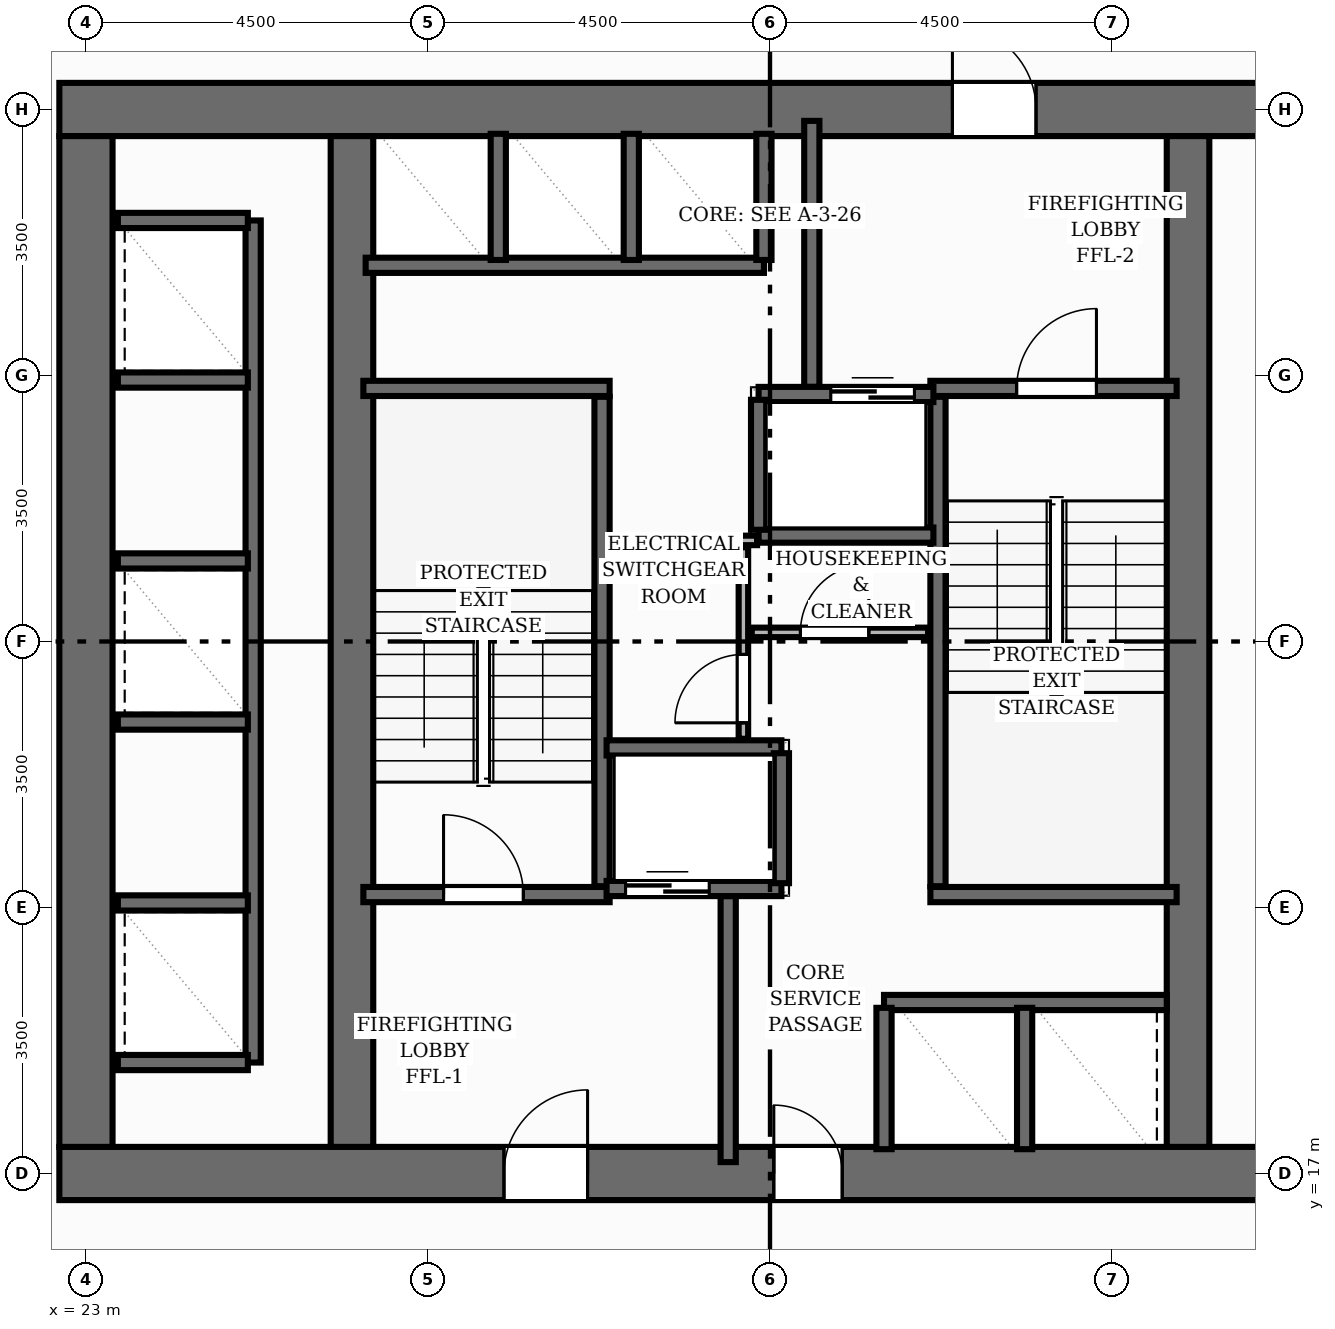
"""IFC4 building model, lengths in metres.
Left out: names, types, materials, properties, quantities, classifications, styles, units other than length and angle.
Written with IfcOpenShell. Run it as: python <this file> out.ifc"""

import sys

from ifc_helpers import new_model, si_unit, direction, frame, frame_2d, origin, place, context, subcontext, project, spatial, rectangle, extrude, element, fill, save


model = new_model("IFC4")
c1 = context("Model", 3, precision=1e-05, world=origin(), true_north=direction((0.0, 1.0)))
c2 = subcontext(c1, "Body", "Model", "MODEL_VIEW")
j1 = project(units=[si_unit("LENGTHUNIT", "METRE"), si_unit("PLANEANGLEUNIT", "RADIAN")], contexts=[c1])
p1 = place(None, origin())
s1 = spatial("IfcSite", under=j1, at=p1, CompositionType="ELEMENT")
p2 = place(p1, origin())
s2 = spatial("IfcBuilding", under=s1, at=p2, CompositionType="ELEMENT")
p3 = place(p2, frame((0.0, 0.0, 102.88)))
s3 = spatial("IfcBuildingStorey", under=s2, at=p3, CompositionType="ELEMENT", Elevation=102.88)
p4 = place(p3, frame((22.65, 17.0, 0.0), z_axis=(0.0, 0.0, 1.0), x_axis=(1.0, 0.0, 0.0)))
e1 = element("IfcWall", 1, at=p4, inside=s3, PredefinedType="SHEAR", context=c2, shape_type="SweptSolid", body=[
    extrude(rectangle(XDim=18.7, YDim=0.7, at=frame_2d((9.35, 0.0))), origin(), (0.0, 0.0, 1.0), 3.2),
])
p5 = place(p4, frame((5.85, 0.0, 0.0)))
e2 = element("IfcOpeningElement", 2, at=p5, cuts=e1, PredefinedType="OPENING", context=c2, shape_type="SweptSolid", body=[
    extrude(rectangle(XDim=1.1, YDim=2.15, at=frame_2d((0.55, 1.075))), frame((0.0, 0.36, 0.0), z_axis=(0.0, -1.0, 0.0), x_axis=(1.0, 0.0, 0.0)), (0.0, 0.0, 1.0), 0.72),
])
p6 = place(p4, frame((9.4, 0.0, 0.0)))
e3 = element("IfcOpeningElement", 3, at=p6, cuts=e1, PredefinedType="OPENING", context=c2, shape_type="SweptSolid", body=[
    extrude(rectangle(XDim=0.9, YDim=2.1, at=frame_2d((0.45, 1.05))), frame((0.0, 0.36, 0.0), z_axis=(0.0, -1.0, 0.0), x_axis=(1.0, 0.0, 0.0)), (0.0, 0.0, 1.0), 0.72),
])
p7 = place(p3, frame((22.65, 31.0, 0.0), z_axis=(0.0, 0.0, 1.0), x_axis=(1.0, 0.0, 0.0)))
e4 = element("IfcWall", 4, at=p7, inside=s3, PredefinedType="SHEAR", context=c2, shape_type="SweptSolid", body=[
    extrude(rectangle(XDim=18.7, YDim=0.7, at=frame_2d((9.35, 0.0))), origin(), (0.0, 0.0, 1.0), 3.2),
])
p8 = place(p7, frame((11.75, 0.0, 0.0)))
e5 = element("IfcOpeningElement", 5, at=p8, cuts=e4, PredefinedType="OPENING", context=c2, shape_type="SweptSolid", body=[
    extrude(rectangle(XDim=1.1, YDim=2.15, at=frame_2d((0.55, 1.075))), frame((0.0, 0.36, 0.0), z_axis=(0.0, -1.0, 0.0), x_axis=(1.0, 0.0, 0.0)), (0.0, 0.0, 1.0), 0.72),
])
p9 = place(p3, frame((23.0, 17.35, 0.0), z_axis=(0.0, 0.0, 1.0), x_axis=(0.0, 1.0, 0.0)))
e6 = element("IfcWall", 6, at=p9, inside=s3, PredefinedType="SHEAR", context=c2, shape_type="SweptSolid", body=[
    extrude(rectangle(XDim=13.3, YDim=0.7, at=frame_2d((6.65, 0.0))), origin(), (0.0, 0.0, 1.0), 3.2),
])
for number, where, z_axis, x_axis in (
    (7, (26.5, 17.35, 0.0), (0.0, 0.0, 1.0), (0.0, 1.0, 0.0)),
    (8, (37.5, 17.35, 0.0), (0.0, 0.0, 1.0), (0.0, 1.0, 0.0)),
):
    element("IfcWall", number, at=place(p3, frame(where, z_axis=z_axis, x_axis=x_axis)), inside=s3, PredefinedType="SHEAR", context=c2, shape_type="SweptSolid", body=[
        extrude(rectangle(XDim=13.3, YDim=0.56, at=frame_2d((6.65, 0.0))), origin(), (0.0, 0.0, 1.0), 3.2),
    ])
p10 = place(p3, frame((29.79, 20.78, 0.0), z_axis=(0.0, 0.0, 1.0), x_axis=(0.0, 1.0, 0.0)))
e9 = element("IfcWall", 9, at=p10, inside=s3, PredefinedType="SHEAR", context=c2, shape_type="SweptSolid", body=[
    extrude(rectangle(XDim=6.44, YDim=0.2, at=frame_2d((3.22, 0.0))), origin(), (0.0, 0.0, 1.0), 3.2),
])
p11 = place(p3, frame((26.65, 27.33, 0.0), z_axis=(0.0, 0.0, 1.0), x_axis=(1.0, 0.0, 0.0)))
e10 = element("IfcWall", 10, at=p11, inside=s3, PredefinedType="SHEAR", context=c2, shape_type="SweptSolid", body=[
    extrude(rectangle(XDim=3.24, YDim=0.2, at=frame_2d((1.62, 0.0))), origin(), (0.0, 0.0, 1.0), 3.2),
])
p12 = place(p3, frame((26.65, 20.67, 0.0), z_axis=(0.0, 0.0, 1.0), x_axis=(1.0, 0.0, 0.0)))
e11 = element("IfcWall", 11, at=p12, inside=s3, PredefinedType="SHEAR", context=c2, shape_type="SweptSolid", body=[
    extrude(rectangle(XDim=3.24, YDim=0.2, at=frame_2d((1.62, 0.0))), origin(), (0.0, 0.0, 1.0), 3.2),
])
p13 = place(p12, frame((1.055, 0.0, 0.0)))
e12 = element("IfcOpeningElement", 12, at=p13, cuts=e11, PredefinedType="OPENING", context=c2, shape_type="SweptSolid", body=[
    extrude(rectangle(XDim=1.05, YDim=2.15, at=frame_2d((0.525, 1.075))), frame((0.0, 0.11, 0.0), z_axis=(0.0, -1.0, 0.0), x_axis=(1.0, 0.0, 0.0)), (0.0, 0.0, 1.0), 0.22),
])
p14 = place(p3, frame((34.21, 20.78, 0.0), z_axis=(0.0, 0.0, 1.0), x_axis=(0.0, 1.0, 0.0)))
e13 = element("IfcWall", 13, at=p14, inside=s3, PredefinedType="SHEAR", context=c2, shape_type="SweptSolid", body=[
    extrude(rectangle(XDim=6.44, YDim=0.2, at=frame_2d((3.22, 0.0))), origin(), (0.0, 0.0, 1.0), 3.2),
])
p15 = place(p3, frame((34.11, 20.67, 0.0), z_axis=(0.0, 0.0, 1.0), x_axis=(1.0, 0.0, 0.0)))
e14 = element("IfcWall", 14, at=p15, inside=s3, PredefinedType="SHEAR", context=c2, shape_type="SweptSolid", body=[
    extrude(rectangle(XDim=3.24, YDim=0.2, at=frame_2d((1.62, 0.0))), origin(), (0.0, 0.0, 1.0), 3.2),
])
p16 = place(p3, frame((34.11, 27.33, 0.0), z_axis=(0.0, 0.0, 1.0), x_axis=(1.0, 0.0, 0.0)))
e15 = element("IfcWall", 15, at=p16, inside=s3, PredefinedType="SHEAR", context=c2, shape_type="SweptSolid", body=[
    extrude(rectangle(XDim=3.24, YDim=0.2, at=frame_2d((1.62, 0.0))), origin(), (0.0, 0.0, 1.0), 3.2),
])
p17 = place(p16, frame((1.135, 0.0, 0.0)))
e16 = element("IfcOpeningElement", 16, at=p17, cuts=e15, PredefinedType="OPENING", context=c2, shape_type="SweptSolid", body=[
    extrude(rectangle(XDim=1.05, YDim=2.15, at=frame_2d((0.525, 1.075))), frame((0.0, 0.11, 0.0), z_axis=(0.0, -1.0, 0.0), x_axis=(1.0, 0.0, 0.0)), (0.0, 0.0, 1.0), 0.22),
])
for number, where, z_axis, x_axis in (
    (17, (31.45, 17.15, 0.0), (0.0, 0.0, 1.0), (0.0, 1.0, 0.0)),
    (18, (32.55, 27.35, 0.0), (0.0, 0.0, 1.0), (0.0, 1.0, 0.0)),
):
    element("IfcWall", number, at=place(p3, frame(where, z_axis=z_axis, x_axis=x_axis)), inside=s3, PredefinedType="SHEAR", context=c2, shape_type="SweptSolid", body=[
        extrude(rectangle(XDim=3.5, YDim=0.2, at=frame_2d((1.75, 0.0))), origin(), (0.0, 0.0, 1.0), 3.2),
    ])
p18 = place(p3, frame((29.85, 20.75, 0.0), z_axis=(0.0, 0.0, 1.0), x_axis=(1.0, 0.0, 0.0)))
e19 = element("IfcWall", 19, at=p18, inside=s3, PredefinedType="SHEAR", context=c2, shape_type="SweptSolid", body=[
    extrude(rectangle(XDim=2.3, YDim=0.2, at=frame_2d((1.15, 0.0))), origin(), (0.0, 0.0, 1.0), 3.2),
])
p19 = place(p18, frame((0.25, 0.0, 0.0)))
e20 = element("IfcOpeningElement", 20, at=p19, cuts=e19, PredefinedType="OPENING", context=c2, shape_type="SweptSolid", body=[
    extrude(rectangle(XDim=1.1, YDim=2.15, at=frame_2d((0.55, 1.075))), frame((0.0, 0.11, 0.0), z_axis=(0.0, -1.0, 0.0), x_axis=(1.0, 0.0, 0.0)), (0.0, 0.0, 1.0), 0.22),
])
p20 = place(p3, frame((29.85, 22.6, 0.0), z_axis=(0.0, 0.0, 1.0), x_axis=(1.0, 0.0, 0.0)))
e21 = element("IfcWall", 21, at=p20, inside=s3, PredefinedType="SHEAR", context=c2, shape_type="SweptSolid", body=[
    extrude(rectangle(XDim=2.3, YDim=0.2, at=frame_2d((1.15, 0.0))), origin(), (0.0, 0.0, 1.0), 3.2),
])
p21 = place(p3, frame((32.15, 20.82, 0.0), z_axis=(0.0, 0.0, 1.0), x_axis=(0.0, 1.0, 0.0)))
e22 = element("IfcWall", 22, at=p21, inside=s3, PredefinedType="SHEAR", context=c2, shape_type="SweptSolid", body=[
    extrude(rectangle(XDim=1.71, YDim=0.2, at=frame_2d((0.855, 0.0))), origin(), (0.0, 0.0, 1.0), 3.2),
])
p22 = place(p3, frame((31.85, 27.25, 0.0), z_axis=(0.0, 0.0, 1.0), x_axis=(1.0, 0.0, 0.0)))
e23 = element("IfcWall", 23, at=p22, inside=s3, PredefinedType="SHEAR", context=c2, shape_type="SweptSolid", body=[
    extrude(rectangle(XDim=2.3, YDim=0.2, at=frame_2d((1.15, 0.0))), origin(), (0.0, 0.0, 1.0), 3.2),
])
p23 = place(p22, frame((0.95, 0.0, 0.0)))
e24 = element("IfcOpeningElement", 24, at=p23, cuts=e23, PredefinedType="OPENING", context=c2, shape_type="SweptSolid", body=[
    extrude(rectangle(XDim=1.1, YDim=2.15, at=frame_2d((0.55, 1.075))), frame((0.0, 0.11, 0.0), z_axis=(0.0, -1.0, 0.0), x_axis=(1.0, 0.0, 0.0)), (0.0, 0.0, 1.0), 0.22),
])
p24 = place(p3, frame((31.85, 25.4, 0.0), z_axis=(0.0, 0.0, 1.0), x_axis=(1.0, 0.0, 0.0)))
e25 = element("IfcWall", 25, at=p24, inside=s3, PredefinedType="SHEAR", context=c2, shape_type="SweptSolid", body=[
    extrude(rectangle(XDim=2.3, YDim=0.2, at=frame_2d((1.15, 0.0))), origin(), (0.0, 0.0, 1.0), 3.2),
])
p25 = place(p3, frame((31.85, 25.47, 0.0), z_axis=(0.0, 0.0, 1.0), x_axis=(0.0, 1.0, 0.0)))
e26 = element("IfcWall", 26, at=p25, inside=s3, PredefinedType="SHEAR", context=c2, shape_type="SweptSolid", body=[
    extrude(rectangle(XDim=1.71, YDim=0.2, at=frame_2d((0.855, 0.0))), origin(), (0.0, 0.0, 1.0), 3.2),
])
p26 = place(p3, frame((25.2, 18.46, 0.0), z_axis=(0.0, 0.0, 1.0), x_axis=(0.0, 1.0, 0.0)))
e27 = element("IfcWall", 27, at=p26, inside=s3, PredefinedType="SHEAR", context=c2, shape_type="SweptSolid", body=[
    extrude(rectangle(XDim=11.08, YDim=0.2, at=frame_2d((5.54, 0.0))), origin(), (0.0, 0.0, 1.0), 3.2),
])
for number, where, z_axis, x_axis in (
    (28, (23.42, 18.46, 0.0), (0.0, 0.0, 1.0), (1.0, 0.0, 0.0)),
    (29, (23.42, 29.54, 0.0), (0.0, 0.0, 1.0), (1.0, 0.0, 0.0)),
    (30, (23.42, 20.56, 0.0), (0.0, 0.0, 1.0), (1.0, 0.0, 0.0)),
    (31, (23.42, 22.94, 0.0), (0.0, 0.0, 1.0), (1.0, 0.0, 0.0)),
    (32, (23.42, 25.06, 0.0), (0.0, 0.0, 1.0), (1.0, 0.0, 0.0)),
    (33, (23.42, 27.44, 0.0), (0.0, 0.0, 1.0), (1.0, 0.0, 0.0)),
):
    element("IfcWall", number, at=place(p3, frame(where, z_axis=z_axis, x_axis=x_axis)), inside=s3, PredefinedType="SHEAR", context=c2, shape_type="SweptSolid", body=[
        extrude(rectangle(XDim=1.71, YDim=0.2, at=frame_2d((0.855, 0.0))), origin(), (0.0, 0.0, 1.0), 3.2),
    ])
p27 = place(p3, frame((26.68, 28.95, 0.0), z_axis=(0.0, 0.0, 1.0), x_axis=(1.0, 0.0, 0.0)))
e34 = element("IfcWall", 34, at=p27, inside=s3, PredefinedType="SHEAR", context=c2, shape_type="SweptSolid", body=[
    extrude(rectangle(XDim=5.24, YDim=0.2, at=frame_2d((2.62, 0.0))), origin(), (0.0, 0.0, 1.0), 3.2),
])
for number, where, z_axis, x_axis in (
    (35, (31.92, 29.02, 0.0), (0.0, 0.0, 1.0), (0.0, 1.0, 0.0)),
    (36, (28.425, 29.02, 0.0), (0.0, 0.0, 1.0), (0.0, 1.0, 0.0)),
    (37, (30.175, 29.02, 0.0), (0.0, 0.0, 1.0), (0.0, 1.0, 0.0)),
):
    element("IfcWall", number, at=place(p3, frame(where, z_axis=z_axis, x_axis=x_axis)), inside=s3, PredefinedType="SHEAR", context=c2, shape_type="SweptSolid", body=[
        extrude(rectangle(XDim=1.66, YDim=0.2, at=frame_2d((0.83, 0.0))), origin(), (0.0, 0.0, 1.0), 3.2),
    ])
p28 = place(p3, frame((33.5, 19.25, 0.0), z_axis=(0.0, 0.0, 1.0), x_axis=(1.0, 0.0, 0.0)))
e38 = element("IfcWall", 38, at=p28, inside=s3, PredefinedType="SHEAR", context=c2, shape_type="SweptSolid", body=[
    extrude(rectangle(XDim=3.72, YDim=0.2, at=frame_2d((1.86, 0.0))), origin(), (0.0, 0.0, 1.0), 3.2),
])
for number, where, z_axis, x_axis in (
    (39, (33.5, 17.32, 0.0), (0.0, 0.0, 1.0), (0.0, 1.0, 0.0)),
    (40, (35.35, 17.32, 0.0), (0.0, 0.0, 1.0), (0.0, 1.0, 0.0)),
):
    element("IfcWall", number, at=place(p3, frame(where, z_axis=z_axis, x_axis=x_axis)), inside=s3, PredefinedType="SHEAR", context=c2, shape_type="SweptSolid", body=[
        extrude(rectangle(XDim=1.86, YDim=0.2, at=frame_2d((0.93, 0.0))), origin(), (0.0, 0.0, 1.0), 3.2),
    ])
p29 = place(p3, frame((31.65, 22.72, 0.0), z_axis=(0.0, 0.0, 1.0), x_axis=(0.0, 1.0, 0.0)))
e41 = element("IfcWall", 41, at=p29, inside=s3, PredefinedType="PARTITIONING", context=c2, shape_type="SweptSolid", body=[
    extrude(rectangle(XDim=2.52, YDim=0.125, at=frame_2d((1.26, 0.0))), origin(), (0.0, 0.0, 1.0), 2.955),
])
p30 = place(p29, frame((0.21, 0.0, 0.0)))
e42 = element("IfcOpeningElement", 42, at=p30, cuts=e41, PredefinedType="OPENING", context=c2, shape_type="SweptSolid", body=[
    extrude(rectangle(XDim=0.9, YDim=2.1, at=frame_2d((0.45, 1.05))), frame((0.0, 0.073, 0.0), z_axis=(0.0, -1.0, 0.0), x_axis=(1.0, 0.0, 0.0)), (0.0, 0.0, 1.0), 0.145),
])
p31 = place(p3, frame((31.76, 24.12, 0.0), z_axis=(0.0, 0.0, 1.0), x_axis=(1.0, 0.0, 0.0)))
e43 = element("IfcWall", 43, at=p31, inside=s3, PredefinedType="PARTITIONING", context=c2, shape_type="SweptSolid", body=[
    extrude(rectangle(XDim=2.32, YDim=0.125, at=frame_2d((1.16, 0.0))), origin(), (0.0, 0.0, 1.0), 2.955),
])
p32 = place(p31, frame((0.64, 0.0, 0.0)))
e44 = element("IfcOpeningElement", 44, at=p32, cuts=e43, PredefinedType="OPENING", context=c2, shape_type="SweptSolid", body=[
    extrude(rectangle(XDim=0.9, YDim=2.1, at=frame_2d((0.45, 1.05))), frame((0.0, 0.073, 0.0), z_axis=(0.0, -1.0, 0.0), x_axis=(1.0, 0.0, 0.0)), (0.0, 0.0, 1.0), 0.145),
])
p33 = place(p3, frame((29.89, 25.33, 0.0), z_axis=(0.0, 0.0, 1.0), x_axis=(1.0, 0.0, 0.0)))
e45 = element("IfcWall", 45, at=p33, inside=s3, PredefinedType="PARTITIONING", context=c2, shape_type="SweptSolid", body=[
    extrude(rectangle(XDim=1.94, YDim=0.125, at=frame_2d((0.97, 0.0))), origin(), (0.0, 0.0, 1.0), 2.955),
])
p34 = place(p13, origin())
e46 = element("IfcDoor", 46, at=p34, inside=s3, OperationType="SINGLE_SWING_LEFT", PredefinedType="DOOR", context=c2, shape_type="SweptSolid", body=[
    extrude(rectangle(XDim=1.05, YDim=2.15, at=frame_2d((0.525, 1.075))), frame((0.0, 0.025, 0.0), z_axis=(0.0, -1.0, 0.0), x_axis=(1.0, 0.0, 0.0)), (0.0, 0.0, 1.0), 0.05),
])
fill(e12, e46)
p35 = place(p17, origin())
e47 = element("IfcDoor", 47, at=p35, inside=s3, OperationType="SINGLE_SWING_RIGHT", PredefinedType="DOOR", context=c2, shape_type="SweptSolid", body=[
    extrude(rectangle(XDim=1.05, YDim=2.15, at=frame_2d((0.525, 1.075))), frame((0.0, 0.025, 0.0), z_axis=(0.0, -1.0, 0.0), x_axis=(1.0, 0.0, 0.0)), (0.0, 0.0, 1.0), 0.05),
])
fill(e16, e47)
p36 = place(p5, origin())
e48 = element("IfcDoor", 48, at=p36, inside=s3, OperationType="SINGLE_SWING_RIGHT", PredefinedType="DOOR", context=c2, shape_type="SweptSolid", body=[
    extrude(rectangle(XDim=1.1, YDim=2.15, at=frame_2d((0.55, 1.075))), frame((0.0, 0.025, 0.0), z_axis=(0.0, -1.0, 0.0), x_axis=(1.0, 0.0, 0.0)), (0.0, 0.0, 1.0), 0.05),
])
fill(e2, e48)
p37 = place(p8, origin())
e49 = element("IfcDoor", 49, at=p37, inside=s3, OperationType="SINGLE_SWING_LEFT", PredefinedType="DOOR", context=c2, shape_type="SweptSolid", body=[
    extrude(rectangle(XDim=1.1, YDim=2.15, at=frame_2d((0.55, 1.075))), frame((0.0, 0.025, 0.0), z_axis=(0.0, -1.0, 0.0), x_axis=(1.0, 0.0, 0.0)), (0.0, 0.0, 1.0), 0.05),
])
fill(e5, e49)
p38 = place(p19, origin())
e50 = element("IfcDoor", 50, at=p38, inside=s3, OperationType="DOUBLE_DOOR_SLIDING", PredefinedType="DOOR", context=c2, shape_type="SweptSolid", body=[
    extrude(rectangle(XDim=1.1, YDim=2.15, at=frame_2d((0.55, 1.075))), frame((0.0, 0.025, 0.0), z_axis=(0.0, -1.0, 0.0), x_axis=(1.0, 0.0, 0.0)), (0.0, 0.0, 1.0), 0.05),
])
fill(e20, e50)
p39 = place(p23, origin())
e51 = element("IfcDoor", 51, at=p39, inside=s3, OperationType="DOUBLE_DOOR_SLIDING", PredefinedType="DOOR", context=c2, shape_type="SweptSolid", body=[
    extrude(rectangle(XDim=1.1, YDim=2.15, at=frame_2d((0.55, 1.075))), frame((0.0, 0.025, 0.0), z_axis=(0.0, -1.0, 0.0), x_axis=(1.0, 0.0, 0.0)), (0.0, 0.0, 1.0), 0.05),
])
fill(e24, e51)
p40 = place(p6, origin())
e52 = element("IfcDoor", 52, at=p40, inside=s3, OperationType="SINGLE_SWING_LEFT", PredefinedType="DOOR", context=c2, shape_type="SweptSolid", body=[
    extrude(rectangle(XDim=0.9, YDim=2.1, at=frame_2d((0.45, 1.05))), frame((0.0, 0.025, 0.0), z_axis=(0.0, -1.0, 0.0), x_axis=(1.0, 0.0, 0.0)), (0.0, 0.0, 1.0), 0.05),
])
fill(e3, e52)
p41 = place(p30, origin())
e53 = element("IfcDoor", 53, at=p41, inside=s3, OperationType="SINGLE_SWING_LEFT", PredefinedType="DOOR", context=c2, shape_type="SweptSolid", body=[
    extrude(rectangle(XDim=0.9, YDim=2.1, at=frame_2d((0.45, 1.05))), frame((0.0, 0.025, 0.0), z_axis=(0.0, -1.0, 0.0), x_axis=(1.0, 0.0, 0.0)), (0.0, 0.0, 1.0), 0.05),
])
fill(e42, e53)
p42 = place(p32, origin())
e54 = element("IfcDoor", 54, at=p42, inside=s3, OperationType="SINGLE_SWING_RIGHT", PredefinedType="DOOR", context=c2, shape_type="SweptSolid", body=[
    extrude(rectangle(XDim=0.9, YDim=2.1, at=frame_2d((0.45, 1.05))), frame((0.0, 0.025, 0.0), z_axis=(0.0, -1.0, 0.0), x_axis=(1.0, 0.0, 0.0)), (0.0, 0.0, 1.0), 0.05),
])
fill(e44, e54)
save(model, sys.argv[1])
